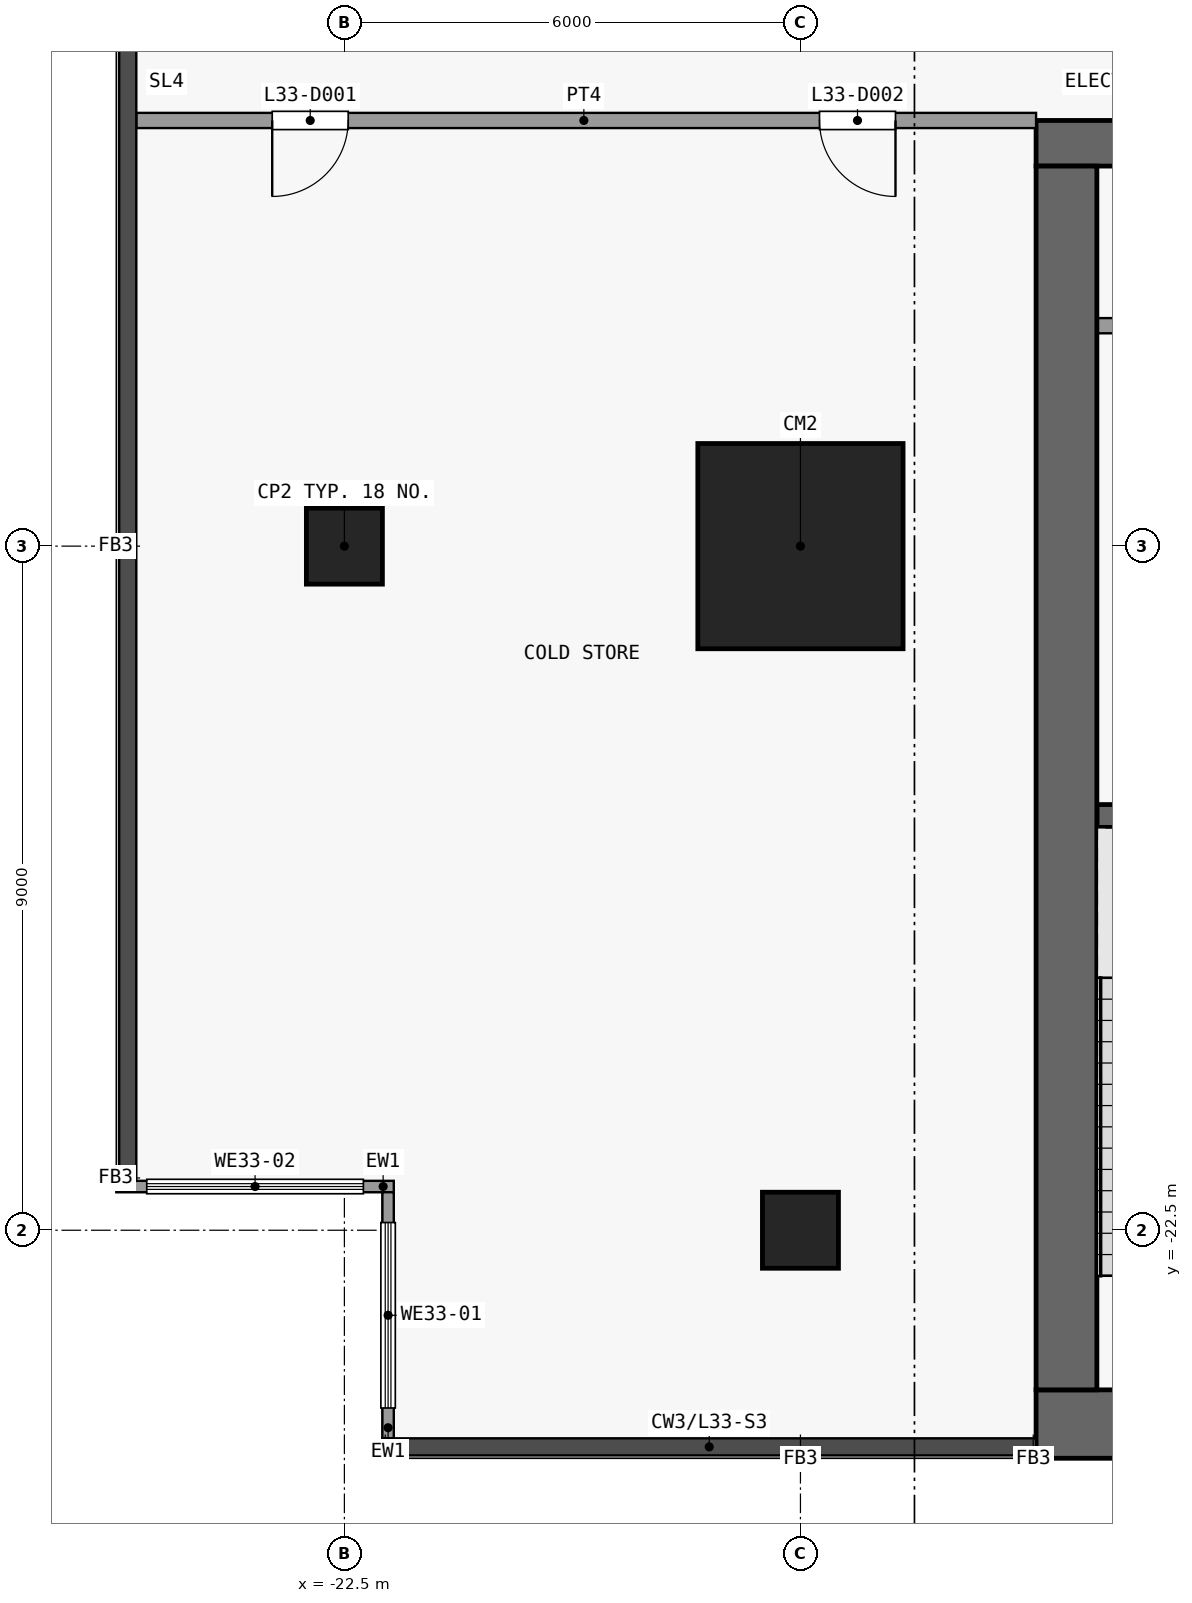
"""IFC4 building model, lengths in metres.
Left out: names, types, materials, properties, quantities, classifications, styles, units other than length and angle.
Written with IfcOpenShell. Run it as: python <this file> out.ifc"""

import sys

from ifc_helpers import new_model, si_unit, direction, frame, frame_2d, origin, origin_2d, place, context, subcontext, project, spatial, rectangle, extrude, element, fill, save


model = new_model("IFC4")
c1 = context("Model", 3, precision=1e-05, world=origin(), true_north=direction((0.0, 1.0)))
c2 = subcontext(c1, "Body", "Model", "MODEL_VIEW")
j1 = project(units=[si_unit("LENGTHUNIT", "METRE"), si_unit("PLANEANGLEUNIT", "RADIAN")], contexts=[c1])
p1 = place(None, origin())
s1 = spatial("IfcSite", under=j1, at=p1, CompositionType="ELEMENT")
p2 = place(p1, origin())
s2 = spatial("IfcBuilding", under=s1, at=p2, CompositionType="ELEMENT")
p3 = place(p2, frame((0.0, 0.0, 133.9)))
s3 = spatial("IfcBuildingStorey", under=s2, at=p3, CompositionType="ELEMENT", Elevation=133.9)
for number, where, z_axis, x_axis in (
    (1, (-22.5, -13.5, 0.0), (0.0, 0.0, 1.0), (1.0, 0.0, 0.0)),
    (2, (-16.5, -22.5, 0.0), (0.0, 0.0, 1.0), (1.0, 0.0, 0.0)),
):
    element("IfcColumn", number, at=place(p3, frame(where, z_axis=z_axis, x_axis=x_axis)), inside=s3, PredefinedType="COLUMN", context=c2, shape_type="SweptSolid", body=[
        extrude(rectangle(XDim=1.0, YDim=1.0, at=origin_2d()), origin(), (0.0, 0.0, 1.0), 5.0),
    ])
p4 = place(p3, frame((-16.5, -13.5, 0.0), z_axis=(0.0, 0.0, 1.0), x_axis=(1.0, 0.0, 0.0)))
e3 = element("IfcColumn", 3, at=p4, inside=s3, PredefinedType="COLUMN", context=c2, shape_type="SweptSolid", body=[
    extrude(rectangle(XDim=2.7, YDim=2.7, at=origin_2d()), origin(), (0.0, 0.0, 1.0), 5.0),
])
p5 = place(p3, frame((-13.4, -25.05, 0.0), z_axis=(0.0, 0.0, 1.0), x_axis=(1.0, 0.0, 0.0)))
e4 = element("IfcWall", 4, at=p5, inside=s3, PredefinedType="SHEAR", context=c2, shape_type="SweptSolid", body=[
    extrude(rectangle(XDim=26.8, YDim=0.9, at=frame_2d((13.4, 0.0))), origin(), (0.0, 0.0, 1.0), 4.7),
])
p6 = place(p3, frame((-13.4, -8.2, 0.0), z_axis=(0.0, 0.0, 1.0), x_axis=(1.0, 0.0, 0.0)))
e5 = element("IfcWall", 5, at=p6, inside=s3, PredefinedType="SHEAR", context=c2, shape_type="SweptSolid", body=[
    extrude(rectangle(XDim=26.8, YDim=0.6, at=frame_2d((13.4, 0.0))), origin(), (0.0, 0.0, 1.0), 4.7),
])
p7 = place(p6, frame((7.7, 0.0, 0.0)))
e6 = element("IfcOpeningElement", 6, at=p7, cuts=e5, PredefinedType="OPENING", context=c2, shape_type="SweptSolid", body=[
    extrude(rectangle(XDim=1.8, YDim=2.1, at=frame_2d((0.9, 1.05))), frame((0.0, 0.31, 0.0), z_axis=(0.0, -1.0, 0.0), x_axis=(1.0, 0.0, 0.0)), (0.0, 0.0, 1.0), 0.62),
])
p8 = place(p6, frame((17.3, 0.0, 0.0)))
e7 = element("IfcOpeningElement", 7, at=p8, cuts=e5, PredefinedType="OPENING", context=c2, shape_type="SweptSolid", body=[
    extrude(rectangle(XDim=1.8, YDim=2.1, at=frame_2d((0.9, 1.05))), frame((0.0, 0.31, 0.0), z_axis=(0.0, -1.0, 0.0), x_axis=(1.0, 0.0, 0.0)), (0.0, 0.0, 1.0), 0.62),
])
p9 = place(p6, frame((2.625, 0.0, 0.0)))
e8 = element("IfcOpeningElement", 8, at=p9, cuts=e5, PredefinedType="OPENING", context=c2, shape_type="SweptSolid", body=[
    extrude(rectangle(XDim=0.9, YDim=2.1, at=frame_2d((0.45, 1.05))), frame((0.0, 0.31, 0.0), z_axis=(0.0, -1.0, 0.0), x_axis=(1.0, 0.0, 0.0)), (0.0, 0.0, 1.0), 0.62),
])
p10 = place(p6, frame((23.275, 0.0, 0.0)))
e9 = element("IfcOpeningElement", 9, at=p10, cuts=e5, PredefinedType="OPENING", context=c2, shape_type="SweptSolid", body=[
    extrude(rectangle(XDim=0.9, YDim=2.1, at=frame_2d((0.45, 1.05))), frame((0.0, 0.31, 0.0), z_axis=(0.0, -1.0, 0.0), x_axis=(1.0, 0.0, 0.0)), (0.0, 0.0, 1.0), 0.62),
])
p11 = place(p3, frame((-13.0, -24.6, 0.0), z_axis=(0.0, 0.0, 1.0), x_axis=(0.0, 1.0, 0.0)))
e10 = element("IfcWall", 10, at=p11, inside=s3, PredefinedType="SHEAR", context=c2, shape_type="SweptSolid", body=[
    extrude(rectangle(XDim=16.1, YDim=0.8, at=frame_2d((8.05, 0.0))), origin(), (0.0, 0.0, 1.0), 4.7),
])
p12 = place(p3, frame((-12.6, -17.05, 0.0), z_axis=(0.0, 0.0, 1.0), x_axis=(1.0, 0.0, 0.0)))
e11 = element("IfcWall", 11, at=p12, inside=s3, PredefinedType="SHEAR", context=c2, shape_type="SweptSolid", body=[
    extrude(rectangle(XDim=2.85, YDim=0.3, at=frame_2d((1.425, 0.0))), origin(), (0.0, 0.0, 1.0), 4.7),
])
p13 = place(p3, frame((-12.6, -10.6, 0.0), z_axis=(0.0, 0.0, 1.0), x_axis=(1.0, 0.0, 0.0)))
e12 = element("IfcWall", 12, at=p13, inside=s3, PredefinedType="PARTITIONING", context=c2, shape_type="SweptSolid", body=[
    extrude(rectangle(XDim=1.45, YDim=0.2, at=frame_2d((0.725, 0.0))), origin(), (0.0, 0.0, 1.0), 4.7),
])
p14 = place(p3, frame((-21.925, -25.238, 0.0), z_axis=(0.0, 0.0, 1.0), x_axis=(0.0, 1.0, 0.0)))
e13 = element("IfcWall", 13, at=p14, inside=s3, PredefinedType="SOLIDWALL", context=c2, shape_type="SweptSolid", body=[
    extrude(rectangle(XDim=3.238, YDim=0.15, at=frame_2d((1.619, 0.0))), origin(), (0.0, 0.0, 1.0), 4.7),
])
p15 = place(p14, frame((0.399, 0.0, 0.9)))
e14 = element("IfcOpeningElement", 14, at=p15, cuts=e13, PredefinedType="OPENING", context=c2, shape_type="SweptSolid", body=[
    extrude(rectangle(XDim=2.44, YDim=2.4, at=frame_2d((1.22, 1.2))), frame((0.0, 0.085, 0.0), z_axis=(0.0, -1.0, 0.0), x_axis=(1.0, 0.0, 0.0)), (0.0, 0.0, 1.0), 0.17),
])
p16 = place(p3, frame((-21.85, -21.925, 0.0), z_axis=(0.0, 0.0, 1.0), x_axis=(-1.0, 0.0, 0.0)))
e15 = element("IfcWall", 15, at=p16, inside=s3, PredefinedType="SOLIDWALL", context=c2, shape_type="SweptSolid", body=[
    extrude(rectangle(XDim=3.65, YDim=0.15, at=frame_2d((1.825, 0.0))), origin(), (0.0, 0.0, 1.0), 4.7),
])
p17 = place(p16, frame((0.4, 0.0, 0.9)))
e16 = element("IfcOpeningElement", 16, at=p17, cuts=e15, PredefinedType="OPENING", context=c2, shape_type="SweptSolid", body=[
    extrude(rectangle(XDim=2.85, YDim=2.4, at=frame_2d((1.425, 1.2))), frame((0.0, 0.085, 0.0), z_axis=(0.0, -1.0, 0.0), x_axis=(1.0, 0.0, 0.0)), (0.0, 0.0, 1.0), 0.17),
])
p18 = place(p3, frame((-25.238, -7.9, 0.0), z_axis=(0.0, 0.0, 1.0), x_axis=(1.0, 0.0, 0.0)))
e17 = element("IfcWall", 17, at=p18, inside=s3, PredefinedType="PARTITIONING", context=c2, shape_type="SweptSolid", body=[
    extrude(rectangle(XDim=11.838, YDim=0.2, at=frame_2d((5.919, 0.0))), origin(), (0.0, 0.0, 1.0), 4.7),
])
p19 = place(p18, frame((1.788, 0.0, 0.0)))
e18 = element("IfcOpeningElement", 18, at=p19, cuts=e17, PredefinedType="OPENING", context=c2, shape_type="SweptSolid", body=[
    extrude(rectangle(XDim=1.0, YDim=2.1, at=frame_2d((0.5, 1.05))), frame((0.0, 0.11, 0.0), z_axis=(0.0, -1.0, 0.0), x_axis=(1.0, 0.0, 0.0)), (0.0, 0.0, 1.0), 0.22),
])
p20 = place(p18, frame((8.988, 0.0, 0.0)))
e19 = element("IfcOpeningElement", 19, at=p20, cuts=e17, PredefinedType="OPENING", context=c2, shape_type="SweptSolid", body=[
    extrude(rectangle(XDim=1.0, YDim=2.1, at=frame_2d((0.5, 1.05))), frame((0.0, 0.11, 0.0), z_axis=(0.0, -1.0, 0.0), x_axis=(1.0, 0.0, 0.0)), (0.0, 0.0, 1.0), 0.22),
])
p21 = place(p15, origin())
e20 = element("IfcWindow", 20, at=p21, inside=s3, PartitioningType="SINGLE_PANEL", PredefinedType="WINDOW", context=c2, shape_type="SweptSolid", body=[
    extrude(rectangle(XDim=2.44, YDim=2.4, at=frame_2d((1.22, 1.2))), frame((0.0, 0.03, 0.0), z_axis=(0.0, -1.0, 0.0), x_axis=(1.0, 0.0, 0.0)), (0.0, 0.0, 1.0), 0.06),
])
fill(e14, e20)
p22 = place(p17, origin())
e21 = element("IfcWindow", 21, at=p22, inside=s3, PartitioningType="SINGLE_PANEL", PredefinedType="WINDOW", context=c2, shape_type="SweptSolid", body=[
    extrude(rectangle(XDim=2.85, YDim=2.4, at=frame_2d((1.425, 1.2))), frame((0.0, 0.03, 0.0), z_axis=(0.0, -1.0, 0.0), x_axis=(1.0, 0.0, 0.0)), (0.0, 0.0, 1.0), 0.06),
])
fill(e16, e21)
p23 = place(p19, origin())
e22 = element("IfcDoor", 22, at=p23, inside=s3, OperationType="SINGLE_SWING_LEFT", PredefinedType="DOOR", context=c2, shape_type="SweptSolid", body=[
    extrude(rectangle(XDim=1.0, YDim=2.1, at=frame_2d((0.5, 1.05))), frame((0.0, 0.025, 0.0), z_axis=(0.0, -1.0, 0.0), x_axis=(1.0, 0.0, 0.0)), (0.0, 0.0, 1.0), 0.05),
])
fill(e18, e22)
p24 = place(p20, origin())
e23 = element("IfcDoor", 23, at=p24, inside=s3, OperationType="SINGLE_SWING_RIGHT", PredefinedType="DOOR", context=c2, shape_type="SweptSolid", body=[
    extrude(rectangle(XDim=1.0, YDim=2.1, at=frame_2d((0.5, 1.05))), frame((0.0, 0.025, 0.0), z_axis=(0.0, -1.0, 0.0), x_axis=(1.0, 0.0, 0.0)), (0.0, 0.0, 1.0), 0.05),
])
fill(e19, e23)
save(model, sys.argv[1])
